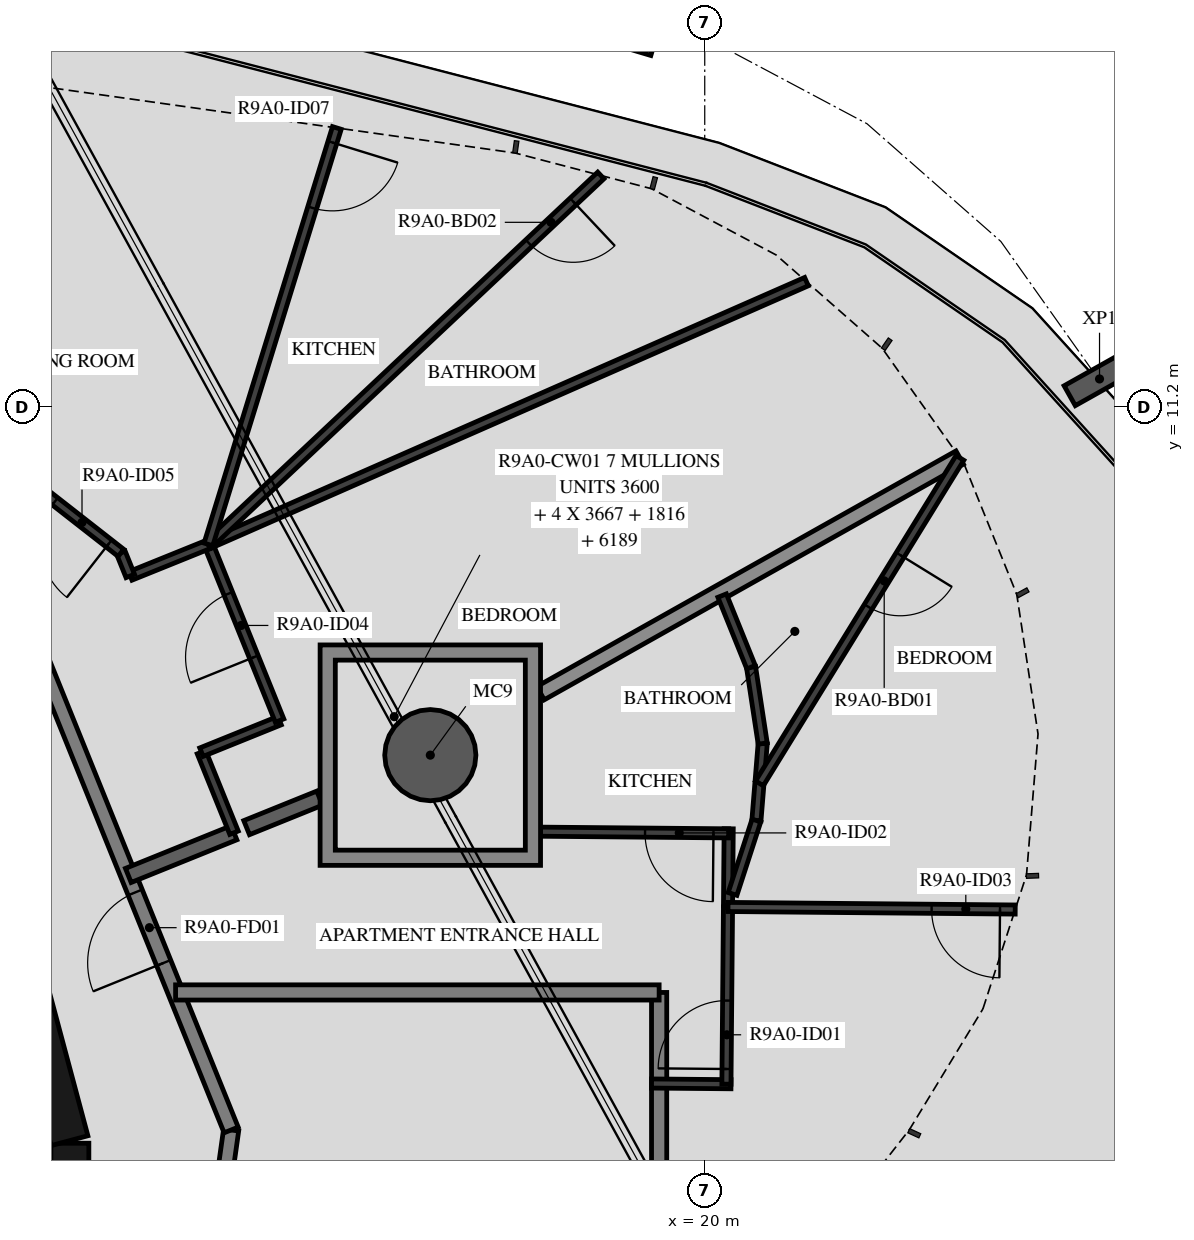
"""IFC4 building model, lengths in metres.
Left out: names, types, materials, properties, quantities, classifications, styles, units other than length and angle.
Written with IfcOpenShell. Run it as: python <this file> out.ifc"""

import sys

from ifc_helpers import new_model, si_unit, direction, frame, frame_2d, origin, origin_2d, place, context, subcontext, project, spatial, polyline, rectangle, hollow_circle, i_section, outline, extrude, element, fill, save


model = new_model("IFC4")
c1 = context("Model", 3, precision=1e-05, world=origin(), true_north=direction((0.0, 1.0)))
c2 = subcontext(c1, "Body", "Model", "MODEL_VIEW")
j1 = project(units=[si_unit("LENGTHUNIT", "METRE"), si_unit("PLANEANGLEUNIT", "RADIAN")], contexts=[c1])
p1 = place(None, origin())
s1 = spatial("IfcSite", under=j1, at=p1, CompositionType="ELEMENT")
p2 = place(p1, origin())
s2 = spatial("IfcBuilding", under=s1, at=p2, CompositionType="ELEMENT")
p3 = place(p2, frame((0.0, 0.0, 333.0)))
s3 = spatial("IfcBuildingStorey", under=s2, at=p3, CompositionType="ELEMENT", Elevation=333.0)
p4 = place(p3, frame((16.39, 6.622, -0.45), z_axis=(0.0, 0.0, 1.0), x_axis=(1.0, 0.0, 0.0)))
e1 = element("IfcColumn", 1, at=p4, inside=s3, PredefinedType="COLUMN", context=c2, shape_type="SweptSolid", body=[
    extrude(hollow_circle(Radius=0.6, WallThickness=0.03, at=origin_2d()), origin(), (0.0, 0.0, 1.0), 3.57),
])
for number, where, z_axis, x_axis in (
    (2, (25.194, 11.571, -0.45), (0.0, 0.0, 1.0), (0.49, -0.872, 0.0)),
    (3, (19.276, 16.301, -0.45), (0.0, 0.0, 1.0), (0.958, -0.286, 0.0)),
):
    element("IfcColumn", number, at=place(p3, frame(where, z_axis=z_axis, x_axis=x_axis)), inside=s3, PredefinedType="COLUMN", context=c2, shape_type="SweptSolid", body=[
        extrude(i_section(OverallWidth=0.3, OverallDepth=0.9, WebThickness=0.019, FlangeThickness=0.035, FilletRadius=0.03, at=origin_2d()), origin(), (0.0, 0.0, 1.0), 3.57),
    ])
p5 = place(p3, frame((11.647, -1.516, 0.0), z_axis=(0.0, 0.0, 1.0), x_axis=(0.0, 1.0, 0.0)))
e4 = element("IfcWall", 4, at=p5, inside=s3, PredefinedType="SHEAR", context=c2, shape_type="SweptSolid", body=[
    extrude(rectangle(XDim=3.033, YDim=0.5, at=frame_2d((1.516, 0.0))), origin(), (0.0, 0.0, 1.0), 3.12),
])
p6 = place(p5, frame((0.616, 0.0, 0.0)))
e5 = element("IfcOpeningElement", 5, at=p6, cuts=e4, PredefinedType="OPENING", context=c2, shape_type="SweptSolid", body=[
    extrude(rectangle(XDim=1.8, YDim=2.1, at=frame_2d((0.9, 1.05))), frame((0.0, 0.26, 0.0), z_axis=(0.0, -1.0, 0.0), x_axis=(1.0, 0.0, 0.0)), (0.0, 0.0, 1.0), 0.52),
])
p7 = place(p3, frame((11.643, 1.55, 0.0), z_axis=(0.0, 0.0, 1.0), x_axis=(-0.258734743916, 0.965948410781, 0.0)))
e6 = element("IfcWall", 6, at=p7, inside=s3, PredefinedType="SHEAR", context=c2, shape_type="SweptSolid", body=[
    extrude(rectangle(XDim=3.033, YDim=0.5, at=frame_2d((1.516, 0.0))), origin(), (0.0, 0.0, 1.0), 3.12),
])
p8 = place(p3, frame((12.77, -5.42, 0.0), z_axis=(0.0, 0.0, 1.0), x_axis=(0.139155334385, 0.990270565508, 0.0)))
e7 = element("IfcWall", 7, at=p8, inside=s3, PredefinedType="STANDARD", context=c2, shape_type="SweptSolid", body=[
    extrude(rectangle(XDim=7.181, YDim=0.2, at=frame_2d((3.59, 0.0))), origin(), (0.0, 0.0, 1.0), 3.12),
])
p9 = place(p8, frame((2.039, 0.0, 0.0)))
e8 = element("IfcOpeningElement", 8, at=p9, cuts=e7, PredefinedType="OPENING", context=c2, shape_type="SweptSolid", body=[
    extrude(rectangle(XDim=1.8, YDim=2.1, at=frame_2d((0.9, 1.05))), frame((0.0, 0.11, 0.0), z_axis=(0.0, -1.0, 0.0), x_axis=(1.0, 0.0, 0.0)), (0.0, 0.0, 1.0), 0.22),
])
p10 = place(p3, frame((13.769, 1.691, 0.0), z_axis=(0.0, 0.0, 1.0), x_axis=(-0.374618189599, 0.92717916932, 0.0)))
e9 = element("IfcWall", 9, at=p10, inside=s3, PredefinedType="STANDARD", context=c2, shape_type="SweptSolid", body=[
    extrude(rectangle(XDim=7.181, YDim=0.2, at=frame_2d((3.591, 0.0))), origin(), (0.0, 0.0, 1.0), 3.12),
])
p11 = place(p10, frame((2.371, 0.0, 0.0)))
e10 = element("IfcOpeningElement", 10, at=p11, cuts=e9, PredefinedType="OPENING", context=c2, shape_type="SweptSolid", body=[
    extrude(rectangle(XDim=1.0, YDim=2.1, at=frame_2d((0.5, 1.05))), frame((0.0, 0.11, 0.0), z_axis=(0.0, -1.0, 0.0), x_axis=(1.0, 0.0, 0.0)), (0.0, 0.0, 1.0), 0.22),
])
p12 = place(p3, frame((19.4, -2.519, 0.0), z_axis=(0.0, 0.0, 1.0), x_axis=(0.0, 1.0, 0.0)))
e11 = element("IfcWall", 11, at=p12, inside=s3, PredefinedType="STANDARD", context=c2, shape_type="SweptSolid", body=[
    extrude(rectangle(XDim=6.019, YDim=0.2, at=frame_2d((3.01, 0.0))), origin(), (0.0, 0.0, 1.0), 3.12),
])
p13 = place(p3, frame((19.4, 3.5, 0.0), z_axis=(0.0, 0.0, 1.0), x_axis=(-1.0, 0.0, 0.0)))
e12 = element("IfcWall", 12, at=p13, inside=s3, PredefinedType="STANDARD", context=c2, shape_type="SweptSolid", body=[
    extrude(rectangle(XDim=6.362, YDim=0.2, at=frame_2d((3.181, 0.0))), origin(), (0.0, 0.0, 1.0), 3.12),
])
p14 = place(p3, frame((13.807, 5.601, 0.0), z_axis=(0.0, 0.0, 1.0), x_axis=(-0.927202702405, -0.374559939999, 0.0)))
e13 = element("IfcWall", 13, at=p14, inside=s3, PredefinedType="STANDARD", context=c2, shape_type="SweptSolid", body=[
    extrude(rectangle(XDim=1.5, YDim=0.2, at=frame_2d((0.75, 0.0))), origin(), (0.0, 0.0, 1.0), 3.12),
])
p15 = place(p3, frame((14.934, 6.056, 0.0), z_axis=(0.0, 0.0, 1.0), x_axis=(-0.927219802432, -0.374517607032, 0.0)))
e14 = element("IfcWall", 14, at=p15, inside=s3, PredefinedType="STANDARD", context=c2, shape_type="SweptSolid", body=[
    extrude(rectangle(XDim=1.036, YDim=0.2, at=frame_2d((0.518, 0.0))), origin(), (0.0, 0.0, 1.0), 3.12),
])
p16 = place(p3, frame((23.354, 10.537, 0.0), z_axis=(0.0, 0.0, 1.0), x_axis=(-0.871719790551, -0.490004700754, 0.0)))
e15 = element("IfcWall", 15, at=p16, inside=s3, PredefinedType="STANDARD", context=c2, shape_type="SweptSolid", body=[
    extrude(rectangle(XDim=6.326, YDim=0.2, at=frame_2d((3.163, 0.0))), origin(), (0.0, 0.0, 1.0), 2.73),
])
p17 = place(p3, frame((19.3, 2.302, 0.0), z_axis=(0.0, 0.0, 1.0), x_axis=(0.999958506341, -0.009109643015, 0.0)))
e16 = element("IfcWall", 16, at=p17, inside=s3, PredefinedType="PARTITIONING", context=c2, shape_type="SweptSolid", body=[
    extrude(rectangle(XDim=1.045, YDim=0.12, at=frame_2d((0.522, 0.0))), origin(), (0.0, 0.0, 1.0), 3.12),
])
p18 = place(p3, frame((20.285, 2.293, 0.0), z_axis=(0.0, 0.0, 1.0), x_axis=(0.008900171034, 0.999960392693, 0.0)))
e17 = element("IfcWall", 17, at=p18, inside=s3, PredefinedType="PARTITIONING", context=c2, shape_type="SweptSolid", body=[
    extrude(rectangle(XDim=2.332, YDim=0.12, at=frame_2d((1.166, 0.0))), origin(), (0.0, 0.0, 1.0), 3.12),
])
p19 = place(p18, frame((0.2, 0.0, 0.0)))
e18 = element("IfcOpeningElement", 18, at=p19, cuts=e17, PredefinedType="OPENING", context=c2, shape_type="SweptSolid", body=[
    extrude(rectangle(XDim=0.9, YDim=2.1, at=frame_2d((0.45, 1.05))), frame((0.0, 0.07, 0.0), z_axis=(0.0, -1.0, 0.0), x_axis=(1.0, 0.0, 0.0)), (0.0, 0.0, 1.0), 0.14),
])
p20 = place(p3, frame((20.306, 4.639, 0.0), z_axis=(0.0, 0.0, 1.0), x_axis=(0.008906724211, 0.999960334345, 0.0)))
e19 = element("IfcWall", 19, at=p20, inside=s3, PredefinedType="PARTITIONING", context=c2, shape_type="SweptSolid", body=[
    extrude(rectangle(XDim=1.014, YDim=0.12, at=frame_2d((0.507, 0.0))), origin(), (0.0, 0.0, 1.0), 3.12),
])
p21 = place(p3, frame((20.315, 5.593, 0.0), z_axis=(0.0, 0.0, 1.0), x_axis=(-0.999960597409, 0.008877140833, 0.0)))
e20 = element("IfcWall", 20, at=p21, inside=s3, PredefinedType="PARTITIONING", context=c2, shape_type="SweptSolid", body=[
    extrude(rectangle(XDim=2.475, YDim=0.12, at=frame_2d((1.238, 0.0))), origin(), (0.0, 0.0, 1.0), 3.12),
])
p22 = place(p21, frame((0.2, 0.0, 0.0)))
e21 = element("IfcOpeningElement", 21, at=p22, cuts=e20, PredefinedType="OPENING", context=c2, shape_type="SweptSolid", body=[
    extrude(rectangle(XDim=0.9, YDim=2.1, at=frame_2d((0.45, 1.05))), frame((0.0, 0.07, 0.0), z_axis=(0.0, -1.0, 0.0), x_axis=(1.0, 0.0, 0.0)), (0.0, 0.0, 1.0), 0.14),
])
p23 = place(p3, frame((24.085, 4.591, 0.0), z_axis=(0.0, 0.0, 1.0), x_axis=(-0.99996025077, 0.008916102255, 0.0)))
e22 = element("IfcWall", 22, at=p23, inside=s3, PredefinedType="PARTITIONING", context=c2, shape_type="SweptSolid", body=[
    extrude(rectangle(XDim=3.779, YDim=0.12, at=frame_2d((1.889, 0.0))), origin(), (0.0, 0.0, 1.0), 2.73),
])
p24 = place(p23, frame((0.2, 0.0, 0.0)))
e23 = element("IfcOpeningElement", 23, at=p24, cuts=e22, PredefinedType="OPENING", context=c2, shape_type="SweptSolid", body=[
    extrude(rectangle(XDim=0.9, YDim=2.1, at=frame_2d((0.45, 1.05))), frame((0.0, 0.07, 0.0), z_axis=(0.0, -1.0, 0.0), x_axis=(1.0, 0.0, 0.0)), (0.0, 0.0, 1.0), 0.14),
])
p25 = place(p3, frame((20.762, 6.775, 0.0), z_axis=(0.0, 0.0, 1.0), x_axis=(-0.08121587, -0.996696534789, 0.0)))
e24 = element("IfcWall", 24, at=p25, inside=s3, PredefinedType="PARTITIONING", context=c2, shape_type="SweptSolid", body=[
    extrude(rectangle(XDim=1.016, YDim=0.12, at=frame_2d((0.508, 0.0))), origin(), (0.0, 0.0, 1.0), 3.12),
])
p26 = place(p3, frame((20.68, 5.762, 0.0), z_axis=(0.0, 0.0, 1.0), x_axis=(-0.30908063779, -0.951035834942, 0.0)))
e25 = element("IfcWall", 25, at=p26, inside=s3, PredefinedType="PARTITIONING", context=c2, shape_type="SweptSolid", body=[
    extrude(rectangle(XDim=1.016, YDim=0.12, at=frame_2d((0.508, 0.0))), origin(), (0.0, 0.0, 1.0), 3.12),
])
p27 = place(p3, frame((23.357, 10.532, 0.0), z_axis=(0.0, 0.0, 1.0), x_axis=(-0.524476563806, -0.851424884542, 0.0)))
e26 = element("IfcWall", 26, at=p27, inside=s3, PredefinedType="PARTITIONING", context=c2, shape_type="SweptSolid", body=[
    extrude(rectangle(XDim=5.029, YDim=0.12, at=frame_2d((2.515, 0.0))), origin(), (0.0, 0.0, 1.0), 3.12),
])
p28 = place(p27, frame((1.5, 0.0, 0.0)))
e27 = element("IfcOpeningElement", 27, at=p28, cuts=e26, PredefinedType="OPENING", context=c2, shape_type="SweptSolid", body=[
    extrude(rectangle(XDim=0.8, YDim=2.1, at=frame_2d((0.4, 1.05))), frame((0.0, 0.07, 0.0), z_axis=(0.0, -1.0, 0.0), x_axis=(1.0, 0.0, 0.0)), (0.0, 0.0, 1.0), 0.14),
])
p29 = place(p3, frame((20.762, 6.775, 0.0), z_axis=(0.0, 0.0, 1.0), x_axis=(-0.150702440861, 0.988579169474, 0.0)))
e28 = element("IfcWall", 28, at=p29, inside=s3, PredefinedType="PARTITIONING", context=c2, shape_type="SweptSolid", body=[
    extrude(rectangle(XDim=1.016, YDim=0.12, at=frame_2d((0.508, 0.0))), origin(), (0.0, 0.0, 1.0), 3.12),
])
p30 = place(p3, frame((20.609, 7.779, 0.0), z_axis=(0.0, 0.0, 1.0), x_axis=(-0.374371668856, 0.927278735633, 0.0)))
e29 = element("IfcWall", 29, at=p30, inside=s3, PredefinedType="PARTITIONING", context=c2, shape_type="SweptSolid", body=[
    extrude(rectangle(XDim=1.016, YDim=0.12, at=frame_2d((0.508, 0.0))), origin(), (0.0, 0.0, 1.0), 3.12),
])
p31 = place(p3, frame((13.807, 5.601, 0.0), z_axis=(0.0, 0.0, 1.0), x_axis=(-0.374480699852, 0.927234708927, 0.0)))
e30 = element("IfcWall", 30, at=p31, inside=s3, PredefinedType="PARTITIONING", context=c2, shape_type="SweptSolid", body=[
    extrude(rectangle(XDim=1.144, YDim=0.12, at=frame_2d((0.572, 0.0))), origin(), (0.0, 0.0, 1.0), 3.12),
])
p32 = place(p3, frame((13.379, 6.661, 0.0), z_axis=(0.0, 0.0, 1.0), x_axis=(0.927225655522, 0.374503115797, 0.0)))
e31 = element("IfcWall", 31, at=p32, inside=s3, PredefinedType="PARTITIONING", context=c2, shape_type="SweptSolid", body=[
    extrude(rectangle(XDim=1.108, YDim=0.12, at=frame_2d((0.554, 0.0))), origin(), (0.0, 0.0, 1.0), 3.12),
])
p33 = place(p3, frame((14.406, 7.076, 0.0), z_axis=(0.0, 0.0, 1.0), x_axis=(-0.374503415005, 0.927225534673, 0.0)))
e32 = element("IfcWall", 32, at=p33, inside=s3, PredefinedType="PARTITIONING", context=c2, shape_type="SweptSolid", body=[
    extrude(rectangle(XDim=2.5, YDim=0.12, at=frame_2d((1.25, 0.0))), origin(), (0.0, 0.0, 1.0), 3.12),
])
p34 = place(p33, frame((0.9, 0.0, 0.0)))
e33 = element("IfcOpeningElement", 33, at=p34, cuts=e32, PredefinedType="OPENING", context=c2, shape_type="SweptSolid", body=[
    extrude(rectangle(XDim=0.9, YDim=2.1, at=frame_2d((0.45, 1.05))), frame((0.0, 0.07, 0.0), z_axis=(0.0, -1.0, 0.0), x_axis=(1.0, 0.0, 0.0)), (0.0, 0.0, 1.0), 0.14),
])
p35 = place(p3, frame((13.47, 9.395, 0.0), z_axis=(0.0, 0.0, 1.0), x_axis=(-0.927180061276, -0.374615982003, 0.0)))
e34 = element("IfcWall", 34, at=p35, inside=s3, PredefinedType="PARTITIONING", context=c2, shape_type="SweptSolid", body=[
    extrude(rectangle(XDim=1.109, YDim=0.12, at=frame_2d((0.554, 0.0))), origin(), (0.0, 0.0, 1.0), 3.12),
])
p36 = place(p3, frame((12.442, 8.979, 0.0), z_axis=(0.0, 0.0, 1.0), x_axis=(-0.374979656603, 0.927033039936, 0.0)))
e35 = element("IfcWall", 35, at=p36, inside=s3, PredefinedType="PARTITIONING", context=c2, shape_type="SweptSolid", body=[
    extrude(rectangle(XDim=0.328, YDim=0.12, at=frame_2d((0.164, 0.0))), origin(), (0.0, 0.0, 1.0), 3.12),
])
p37 = place(p3, frame((12.319, 9.283, 0.0), z_axis=(0.0, 0.0, 1.0), x_axis=(-0.788000268464, 0.61567489546, 0.0)))
e36 = element("IfcWall", 36, at=p37, inside=s3, PredefinedType="PARTITIONING", context=c2, shape_type="SweptSolid", body=[
    extrude(rectangle(XDim=7.985, YDim=0.12, at=frame_2d((3.992, 0.0))), origin(), (0.0, 0.0, 1.0), 3.12),
])
p38 = place(p37, frame((0.2, 0.0, 0.0)))
e37 = element("IfcOpeningElement", 37, at=p38, cuts=e36, PredefinedType="OPENING", context=c2, shape_type="SweptSolid", body=[
    extrude(rectangle(XDim=0.9, YDim=2.1, at=frame_2d((0.45, 1.05))), frame((0.0, 0.07, 0.0), z_axis=(0.0, -1.0, 0.0), x_axis=(1.0, 0.0, 0.0)), (0.0, 0.0, 1.0), 0.14),
])
p39 = place(p3, frame((21.338, 12.851, 0.0), z_axis=(0.0, 0.0, 1.0), x_axis=(-0.915538158579, -0.402231127818, 0.0)))
e38 = element("IfcWall", 38, at=p39, inside=s3, PredefinedType="PARTITIONING", context=c2, shape_type="SweptSolid", body=[
    extrude(rectangle(XDim=8.594, YDim=0.12, at=frame_2d((4.297, 0.0))), origin(), (0.0, 0.0, 1.0), 3.12),
])
p40 = place(p3, frame((18.633, 14.248, 0.0), z_axis=(0.0, 0.0, 1.0), x_axis=(-0.728595344908, -0.684944394369, 0.0)))
e39 = element("IfcWall", 39, at=p40, inside=s3, PredefinedType="PARTITIONING", context=c2, shape_type="SweptSolid", body=[
    extrude(rectangle(XDim=7.086, YDim=0.12, at=frame_2d((3.543, 0.0))), origin(), (0.0, 0.0, 1.0), 3.12),
])
p41 = place(p40, frame((0.5, 0.0, 0.0)))
e40 = element("IfcOpeningElement", 40, at=p41, cuts=e39, PredefinedType="OPENING", context=c2, shape_type="SweptSolid", body=[
    extrude(rectangle(XDim=0.8, YDim=2.1, at=frame_2d((0.4, 1.05))), frame((0.0, 0.07, 0.0), z_axis=(0.0, -1.0, 0.0), x_axis=(1.0, 0.0, 0.0)), (0.0, 0.0, 1.0), 0.14),
])
p42 = place(p3, frame((15.16, 14.873, 0.0), z_axis=(0.0, 0.0, 1.0), x_axis=(-0.294750051258, -0.955574386055, 0.0)))
e41 = element("IfcWall", 41, at=p42, inside=s3, PredefinedType="PARTITIONING", context=c2, shape_type="SweptSolid", body=[
    extrude(rectangle(XDim=5.733, YDim=0.12, at=frame_2d((2.867, 0.0))), origin(), (0.0, 0.0, 1.0), 3.12),
])
p43 = place(p42, frame((0.2, 0.0, 0.0)))
e42 = element("IfcOpeningElement", 42, at=p43, cuts=e41, PredefinedType="OPENING", context=c2, shape_type="SweptSolid", body=[
    extrude(rectangle(XDim=0.9, YDim=2.1, at=frame_2d((0.45, 1.05))), frame((0.0, 0.07, 0.0), z_axis=(0.0, -1.0, 0.0), x_axis=(1.0, 0.0, 0.0)), (0.0, 0.0, 1.0), 0.14),
])
p44 = place(p3, origin())
e43 = element("IfcWall", 43, at=p44, inside=s3, PredefinedType="STANDARD", context=c2, shape_type="SweptSolid", body=[
    extrude(outline(polyline([(17.84, 8.072), (17.84, 5.172), (14.94, 5.172), (14.94, 8.072), (17.84, 8.072)]), holes=[polyline([(15.14, 5.372), (17.64, 5.372), (17.64, 7.872), (15.14, 7.872), (15.14, 5.372)])]), origin(), (0.0, 0.0, 1.0), 3.12),
])
p45 = place(p11, origin())
e44 = element("IfcDoor", 44, at=p45, inside=s3, OperationType="SINGLE_SWING_LEFT", PredefinedType="DOOR", context=c2, shape_type="SweptSolid", body=[
    extrude(rectangle(XDim=1.0, YDim=2.1, at=frame_2d((0.5, 1.05))), frame((0.0, 0.025, 0.0), z_axis=(0.0, -1.0, 0.0), x_axis=(1.0, 0.0, 0.0)), (0.0, 0.0, 1.0), 0.05),
])
fill(e10, e44)
p46 = place(p19, origin())
e45 = element("IfcDoor", 45, at=p46, inside=s3, OperationType="SINGLE_SWING_RIGHT", PredefinedType="DOOR", context=c2, shape_type="SweptSolid", body=[
    extrude(rectangle(XDim=0.9, YDim=2.1, at=frame_2d((0.45, 1.05))), frame((0.0, 0.025, 0.0), z_axis=(0.0, -1.0, 0.0), x_axis=(1.0, 0.0, 0.0)), (0.0, 0.0, 1.0), 0.05),
])
fill(e18, e45)
p47 = place(p22, origin())
e46 = element("IfcDoor", 46, at=p47, inside=s3, OperationType="SINGLE_SWING_RIGHT", PredefinedType="DOOR", context=c2, shape_type="SweptSolid", body=[
    extrude(rectangle(XDim=0.9, YDim=2.1, at=frame_2d((0.45, 1.05))), frame((0.0, 0.025, 0.0), z_axis=(0.0, -1.0, 0.0), x_axis=(1.0, 0.0, 0.0)), (0.0, 0.0, 1.0), 0.05),
])
fill(e21, e46)
p48 = place(p24, origin())
e47 = element("IfcDoor", 47, at=p48, inside=s3, OperationType="SINGLE_SWING_RIGHT", PredefinedType="DOOR", context=c2, shape_type="SweptSolid", body=[
    extrude(rectangle(XDim=0.9, YDim=2.1, at=frame_2d((0.45, 1.05))), frame((0.0, 0.025, 0.0), z_axis=(0.0, -1.0, 0.0), x_axis=(1.0, 0.0, 0.0)), (0.0, 0.0, 1.0), 0.05),
])
fill(e23, e47)
p49 = place(p28, origin())
e48 = element("IfcDoor", 48, at=p49, inside=s3, OperationType="SINGLE_SWING_RIGHT", PredefinedType="DOOR", context=c2, shape_type="SweptSolid", body=[
    extrude(rectangle(XDim=0.8, YDim=2.1, at=frame_2d((0.4, 1.05))), frame((0.0, 0.025, 0.0), z_axis=(0.0, -1.0, 0.0), x_axis=(1.0, 0.0, 0.0)), (0.0, 0.0, 1.0), 0.05),
])
fill(e27, e48)
p50 = place(p34, origin())
e49 = element("IfcDoor", 49, at=p50, inside=s3, OperationType="SINGLE_SWING_LEFT", PredefinedType="DOOR", context=c2, shape_type="SweptSolid", body=[
    extrude(rectangle(XDim=0.9, YDim=2.1, at=frame_2d((0.45, 1.05))), frame((0.0, 0.025, 0.0), z_axis=(0.0, -1.0, 0.0), x_axis=(1.0, 0.0, 0.0)), (0.0, 0.0, 1.0), 0.05),
])
fill(e33, e49)
p51 = place(p38, origin())
e50 = element("IfcDoor", 50, at=p51, inside=s3, OperationType="SINGLE_SWING_LEFT", PredefinedType="DOOR", context=c2, shape_type="SweptSolid", body=[
    extrude(rectangle(XDim=0.9, YDim=2.1, at=frame_2d((0.45, 1.05))), frame((0.0, 0.025, 0.0), z_axis=(0.0, -1.0, 0.0), x_axis=(1.0, 0.0, 0.0)), (0.0, 0.0, 1.0), 0.05),
])
fill(e37, e50)
p52 = place(p43, origin())
e51 = element("IfcDoor", 51, at=p52, inside=s3, OperationType="SINGLE_SWING_LEFT", PredefinedType="DOOR", context=c2, shape_type="SweptSolid", body=[
    extrude(rectangle(XDim=0.9, YDim=2.1, at=frame_2d((0.45, 1.05))), frame((0.0, 0.025, 0.0), z_axis=(0.0, -1.0, 0.0), x_axis=(1.0, 0.0, 0.0)), (0.0, 0.0, 1.0), 0.05),
])
fill(e42, e51)
p53 = place(p41, origin())
e52 = element("IfcDoor", 52, at=p53, inside=s3, OperationType="SINGLE_SWING_LEFT", PredefinedType="DOOR", context=c2, shape_type="SweptSolid", body=[
    extrude(rectangle(XDim=0.8, YDim=2.1, at=frame_2d((0.4, 1.05))), frame((0.0, 0.025, 0.0), z_axis=(0.0, -1.0, 0.0), x_axis=(1.0, 0.0, 0.0)), (0.0, 0.0, 1.0), 0.05),
])
fill(e40, e52)
save(model, sys.argv[1])
